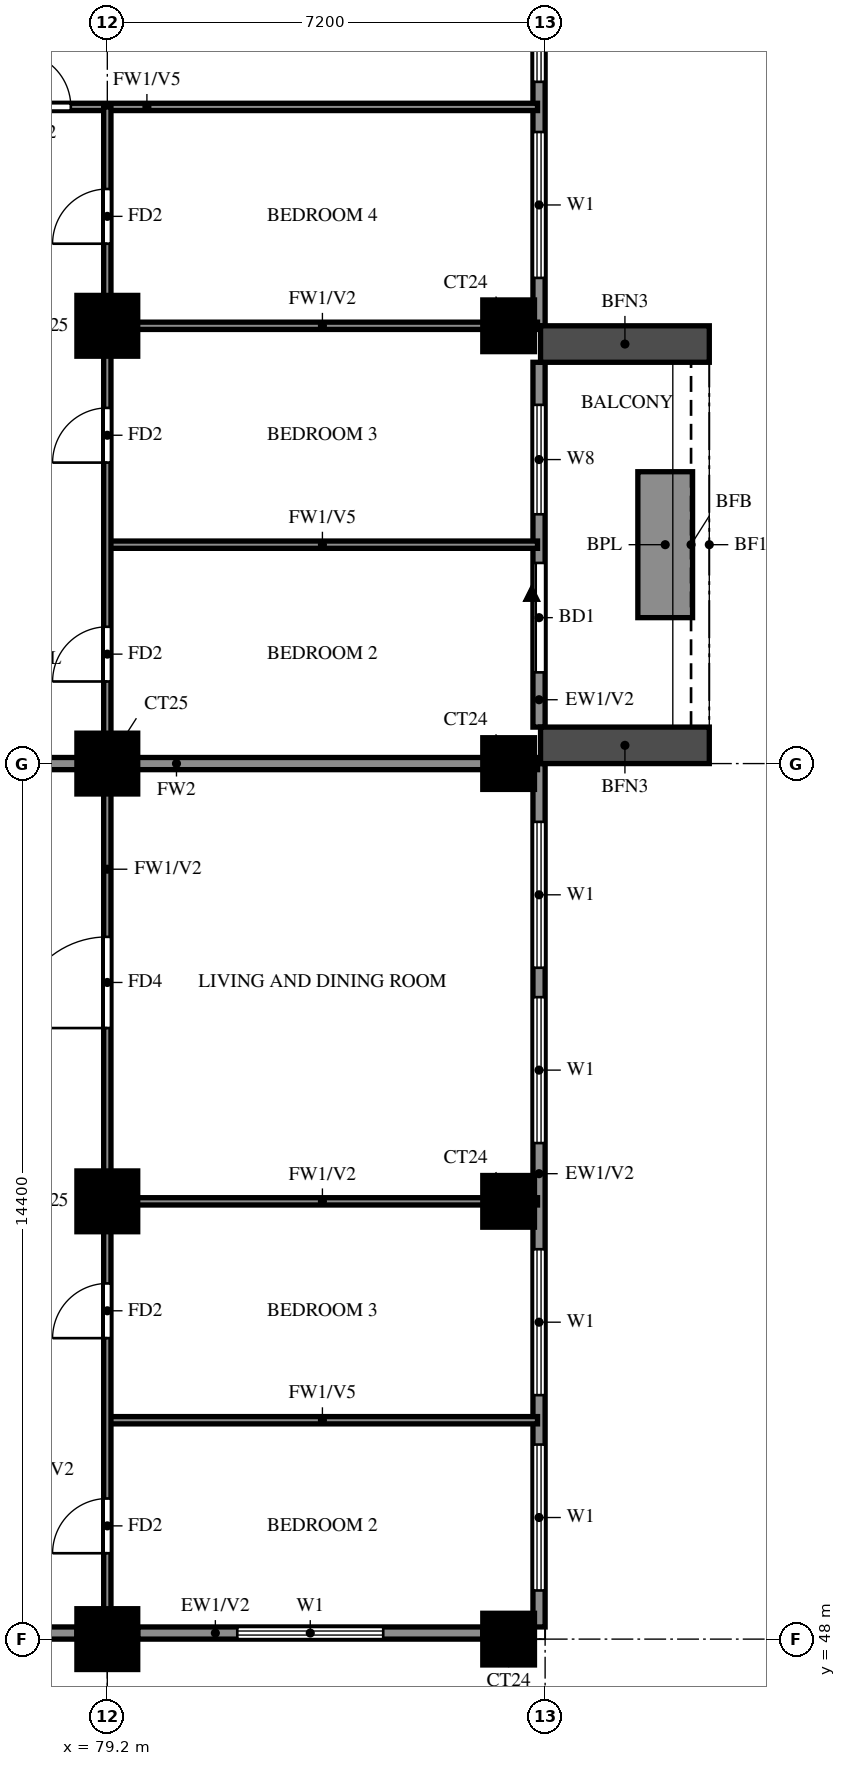
"""IFC4 building model, lengths in metres.
Left out: names, types, materials, properties, quantities, classifications, styles, units other than length and angle.
Written with IfcOpenShell. Run it as: python <this file> out.ifc"""

import sys

from ifc_helpers import new_model, si_unit, direction, frame, frame_2d, origin, origin_2d, place, context, subcontext, project, spatial, rectangle, extrude, source, transform, mapped, element, fill, save


model = new_model("IFC4")
c1 = context("Model", 3, precision=1e-05, world=origin(), true_north=direction((0.0, 1.0)))
c2 = subcontext(c1, "Body", "Model", "MODEL_VIEW")
j1 = project(units=[si_unit("LENGTHUNIT", "METRE"), si_unit("PLANEANGLEUNIT", "RADIAN")], contexts=[c1])
p1 = place(None, origin())
s1 = spatial("IfcSite", under=j1, at=p1, CompositionType="ELEMENT")
p2 = place(p1, origin())
s2 = spatial("IfcBuilding", under=s1, at=p2, CompositionType="ELEMENT")
p3 = place(p2, frame((0.0, 0.0, 157.0)))
s3 = spatial("IfcBuildingStorey", under=s2, at=p3, CompositionType="ELEMENT", Elevation=157.0)
m1 = source(origin(), c2, "Body", "SweptSolid", [
    extrude(rectangle(XDim=1.0, YDim=1.0, at=origin_2d()), origin(), (0.0, 0.0, 1.0), 3.2),
])
p4 = place(p3, frame((79.2, 48.0, 0.0), z_axis=(0.0, 0.0, 1.0), x_axis=(1.0, 0.0, 0.0)))
e1 = element("IfcColumn", 1, at=p4, inside=s3, PredefinedType="COLUMN", context=c2, shape_type="MappedRepresentation", body=[
    mapped(m1, transform((0.0, 0.0, 0.0))),
])
m2 = source(origin(), c2, "Body", "SweptSolid", [
    extrude(rectangle(XDim=0.85, YDim=0.85, at=origin_2d()), origin(), (0.0, 0.0, 1.0), 3.2),
])
p5 = place(p3, frame((85.8, 48.0, 0.0), z_axis=(0.0, 0.0, 1.0), x_axis=(1.0, 0.0, 0.0)))
e2 = element("IfcColumn", 2, at=p5, inside=s3, PredefinedType="COLUMN", context=c2, shape_type="MappedRepresentation", body=[
    mapped(m2, transform((0.0, 0.0, 0.0))),
])
p6 = place(p3, frame((79.2, 55.2, 0.0), z_axis=(0.0, 0.0, 1.0), x_axis=(1.0, 0.0, 0.0)))
e3 = element("IfcColumn", 3, at=p6, inside=s3, PredefinedType="COLUMN", context=c2, shape_type="MappedRepresentation", body=[
    mapped(m1, transform((0.0, 0.0, 0.0))),
])
p7 = place(p3, frame((85.8, 55.2, 0.0), z_axis=(0.0, 0.0, 1.0), x_axis=(1.0, 0.0, 0.0)))
e4 = element("IfcColumn", 4, at=p7, inside=s3, PredefinedType="COLUMN", context=c2, shape_type="MappedRepresentation", body=[
    mapped(m2, transform((0.0, 0.0, 0.0))),
])
p8 = place(p3, frame((79.2, 62.4, 0.0), z_axis=(0.0, 0.0, 1.0), x_axis=(1.0, 0.0, 0.0)))
e5 = element("IfcColumn", 5, at=p8, inside=s3, PredefinedType="COLUMN", context=c2, shape_type="MappedRepresentation", body=[
    mapped(m1, transform((0.0, 0.0, 0.0))),
])
p9 = place(p3, frame((85.8, 62.4, 0.0), z_axis=(0.0, 0.0, 1.0), x_axis=(1.0, 0.0, 0.0)))
e6 = element("IfcColumn", 6, at=p9, inside=s3, PredefinedType="COLUMN", context=c2, shape_type="MappedRepresentation", body=[
    mapped(m2, transform((0.0, 0.0, 0.0))),
])
p10 = place(p3, frame((79.2, 69.6, 0.0), z_axis=(0.0, 0.0, 1.0), x_axis=(1.0, 0.0, 0.0)))
e7 = element("IfcColumn", 7, at=p10, inside=s3, PredefinedType="COLUMN", context=c2, shape_type="MappedRepresentation", body=[
    mapped(m1, transform((0.0, 0.0, 0.0))),
])
p11 = place(p3, frame((85.8, 69.6, 0.0), z_axis=(0.0, 0.0, 1.0), x_axis=(1.0, 0.0, 0.0)))
e8 = element("IfcColumn", 8, at=p11, inside=s3, PredefinedType="COLUMN", context=c2, shape_type="MappedRepresentation", body=[
    mapped(m2, transform((0.0, 0.0, 0.0))),
])
p12 = place(p3, frame((85.719, 39.881, 0.0), z_axis=(0.0, 0.0, 1.0), x_axis=(-0.86377618652, 0.503875678716, 0.0)))
e9 = element("IfcWall", 9, at=p12, inside=s3, PredefinedType="SOLIDWALL", context=c2, shape_type="SweptSolid", body=[
    extrude(rectangle(XDim=16.311, YDim=0.2, at=frame_2d((8.156, 0.0))), origin(), (0.0, 0.0, 1.0), 3.2),
])
p13 = place(p12, frame((13.326, 0.0, 1.5)))
e10 = element("IfcOpeningElement", 10, at=p13, cuts=e9, PredefinedType="OPENING", context=c2, shape_type="SweptSolid", body=[
    extrude(rectangle(XDim=0.9, YDim=0.9, at=frame_2d((0.45, 0.45))), frame((0.0, 0.11, 0.0), z_axis=(0.0, -1.0, 0.0), x_axis=(1.0, 0.0, 0.0)), (0.0, 0.0, 1.0), 0.22),
])
p14 = place(p3, frame((71.99, 48.1, 0.0), z_axis=(0.0, 0.0, 1.0), x_axis=(1.0, 0.0, 0.0)))
e11 = element("IfcWall", 11, at=p14, inside=s3, PredefinedType="SOLIDWALL", context=c2, shape_type="SweptSolid", body=[
    extrude(rectangle(XDim=6.71, YDim=0.2, at=frame_2d((3.355, 0.0))), origin(), (0.0, 0.0, 1.0), 3.2),
])
p15 = place(p3, frame((79.7, 48.1, 0.0), z_axis=(0.0, 0.0, 1.0), x_axis=(1.0, 0.0, 0.0)))
e12 = element("IfcWall", 12, at=p15, inside=s3, PredefinedType="SOLIDWALL", context=c2, shape_type="SweptSolid", body=[
    extrude(rectangle(XDim=5.675, YDim=0.2, at=frame_2d((2.837, 0.0))), origin(), (0.0, 0.0, 1.0), 3.2),
])
p16 = place(p15, frame((1.637, 0.0, 0.6)))
e13 = element("IfcOpeningElement", 13, at=p16, cuts=e12, PredefinedType="OPENING", context=c2, shape_type="SweptSolid", body=[
    extrude(rectangle(XDim=2.4, YDim=2.4, at=frame_2d((1.2, 1.2))), frame((0.0, 0.11, 0.0), z_axis=(0.0, -1.0, 0.0), x_axis=(1.0, 0.0, 0.0)), (0.0, 0.0, 1.0), 0.22),
])
p17 = place(p3, frame((86.3, 48.2, 0.0), z_axis=(0.0, 0.0, 1.0), x_axis=(0.0, 1.0, 0.0)))
e14 = element("IfcWall", 14, at=p17, inside=s3, PredefinedType="SOLIDWALL", context=c2, shape_type="SweptSolid", body=[
    extrude(rectangle(XDim=14.2, YDim=0.2, at=frame_2d((7.1, 0.0))), origin(), (0.0, 0.0, 1.0), 3.2),
])
p18 = place(p17, frame((0.6, 0.0, 0.6)))
e15 = element("IfcOpeningElement", 15, at=p18, cuts=e14, PredefinedType="OPENING", context=c2, shape_type="SweptSolid", body=[
    extrude(rectangle(XDim=2.4, YDim=2.4, at=frame_2d((1.2, 1.2))), frame((0.0, 0.11, 0.0), z_axis=(0.0, -1.0, 0.0), x_axis=(1.0, 0.0, 0.0)), (0.0, 0.0, 1.0), 0.22),
])
p19 = place(p17, frame((3.812, 0.0, 0.6)))
e16 = element("IfcOpeningElement", 16, at=p19, cuts=e14, PredefinedType="OPENING", context=c2, shape_type="SweptSolid", body=[
    extrude(rectangle(XDim=2.4, YDim=2.4, at=frame_2d((1.2, 1.2))), frame((0.0, 0.11, 0.0), z_axis=(0.0, -1.0, 0.0), x_axis=(1.0, 0.0, 0.0)), (0.0, 0.0, 1.0), 0.22),
])
p20 = place(p17, frame((7.958, 0.0, 0.6)))
e17 = element("IfcOpeningElement", 17, at=p20, cuts=e14, PredefinedType="OPENING", context=c2, shape_type="SweptSolid", body=[
    extrude(rectangle(XDim=2.4, YDim=2.4, at=frame_2d((1.2, 1.2))), frame((0.0, 0.11, 0.0), z_axis=(0.0, -1.0, 0.0), x_axis=(1.0, 0.0, 0.0)), (0.0, 0.0, 1.0), 0.22),
])
p21 = place(p17, frame((10.842, 0.0, 0.6)))
e18 = element("IfcOpeningElement", 18, at=p21, cuts=e14, PredefinedType="OPENING", context=c2, shape_type="SweptSolid", body=[
    extrude(rectangle(XDim=2.4, YDim=2.4, at=frame_2d((1.2, 1.2))), frame((0.0, 0.11, 0.0), z_axis=(0.0, -1.0, 0.0), x_axis=(1.0, 0.0, 0.0)), (0.0, 0.0, 1.0), 0.22),
])
p22 = place(p3, frame((86.3, 63.0, 0.0), z_axis=(0.0, 0.0, 1.0), x_axis=(0.0, 1.0, 0.0)))
e19 = element("IfcWall", 19, at=p22, inside=s3, PredefinedType="SOLIDWALL", context=c2, shape_type="SweptSolid", body=[
    extrude(rectangle(XDim=6.0, YDim=0.2, at=frame_2d((3.0, 0.0))), origin(), (0.0, 0.0, 1.0), 3.2),
])
p23 = place(p22, frame((0.9, 0.0, 0.0)))
e20 = element("IfcOpeningElement", 20, at=p23, cuts=e19, PredefinedType="OPENING", context=c2, shape_type="SweptSolid", body=[
    extrude(rectangle(XDim=1.8, YDim=2.4, at=frame_2d((0.9, 1.2))), frame((0.0, 0.11, 0.0), z_axis=(0.0, -1.0, 0.0), x_axis=(1.0, 0.0, 0.0)), (0.0, 0.0, 1.0), 0.22),
])
p24 = place(p22, frame((3.5, 0.0, 0.6)))
e21 = element("IfcOpeningElement", 21, at=p24, cuts=e19, PredefinedType="OPENING", context=c2, shape_type="SweptSolid", body=[
    extrude(rectangle(XDim=1.8, YDim=2.4, at=frame_2d((0.9, 1.2))), frame((0.0, 0.11, 0.0), z_axis=(0.0, -1.0, 0.0), x_axis=(1.0, 0.0, 0.0)), (0.0, 0.0, 1.0), 0.22),
])
p25 = place(p3, frame((86.3, 69.6, 0.0), z_axis=(0.0, 0.0, 1.0), x_axis=(0.0, 1.0, 0.0)))
e22 = element("IfcWall", 22, at=p25, inside=s3, PredefinedType="SOLIDWALL", context=c2, shape_type="SweptSolid", body=[
    extrude(rectangle(XDim=7.2, YDim=0.2, at=frame_2d((3.6, 0.0))), origin(), (0.0, 0.0, 1.0), 3.2),
])
p26 = place(p25, frame((0.788, 0.0, 0.6)))
e23 = element("IfcOpeningElement", 23, at=p26, cuts=e22, PredefinedType="OPENING", context=c2, shape_type="SweptSolid", body=[
    extrude(rectangle(XDim=2.4, YDim=2.4, at=frame_2d((1.2, 1.2))), frame((0.0, 0.11, 0.0), z_axis=(0.0, -1.0, 0.0), x_axis=(1.0, 0.0, 0.0)), (0.0, 0.0, 1.0), 0.22),
])
p27 = place(p25, frame((4.012, 0.0, 0.6)))
e24 = element("IfcOpeningElement", 24, at=p27, cuts=e22, PredefinedType="OPENING", context=c2, shape_type="SweptSolid", body=[
    extrude(rectangle(XDim=2.4, YDim=2.4, at=frame_2d((1.2, 1.2))), frame((0.0, 0.11, 0.0), z_axis=(0.0, -1.0, 0.0), x_axis=(1.0, 0.0, 0.0)), (0.0, 0.0, 1.0), 0.22),
])
for number, where, z_axis, x_axis in (
    (25, (86.325, 62.7, 0.0), (0.0, 0.0, 1.0), (1.0, 0.0, 0.0)),
    (26, (86.325, 69.3, 0.0), (0.0, 0.0, 1.0), (1.0, 0.0, 0.0)),
):
    element("IfcWall", number, at=place(p3, frame(where, z_axis=z_axis, x_axis=x_axis)), inside=s3, PredefinedType="SOLIDWALL", context=c2, shape_type="SweptSolid", body=[
        extrude(rectangle(XDim=2.775, YDim=0.6, at=frame_2d((1.388, 0.0))), origin(), (0.0, 0.0, 1.0), 2.85),
    ])
p28 = place(p3, frame((88.375, 64.8, 0.0), z_axis=(0.0, 0.0, 1.0), x_axis=(0.0, 1.0, 0.0)))
e27 = element("IfcWall", 27, at=p28, inside=s3, PredefinedType="SOLIDWALL", context=c2, shape_type="SweptSolid", body=[
    extrude(rectangle(XDim=2.4, YDim=0.9, at=frame_2d((1.2, 0.0))), origin(), (0.0, 0.0, 1.0), 0.9),
])
p29 = place(p3, frame((74.4, 62.4, 0.0), z_axis=(0.0, 0.0, 1.0), x_axis=(1.0, 0.0, 0.0)))
e28 = element("IfcWall", 28, at=p29, inside=s3, PredefinedType="SOLIDWALL", context=c2, shape_type="SweptSolid", body=[
    extrude(rectangle(XDim=11.875, YDim=0.2, at=frame_2d((5.938, 0.0))), origin(), (0.0, 0.0, 1.0), 3.2),
])
p30 = place(p3, frame((79.2, 51.6, 0.0), z_axis=(0.0, 0.0, 1.0), x_axis=(1.0, 0.0, 0.0)))
e29 = element("IfcWall", 29, at=p30, inside=s3, PredefinedType="PARTITIONING", context=c2, shape_type="SweptSolid", body=[
    extrude(rectangle(XDim=7.075, YDim=0.12, at=frame_2d((3.538, 0.0))), origin(), (0.0, 0.0, 1.0), 2.3),
])
p31 = place(p3, frame((79.2, 55.2, 0.0), z_axis=(0.0, 0.0, 1.0), x_axis=(1.0, 0.0, 0.0)))
e30 = element("IfcWall", 30, at=p31, inside=s3, PredefinedType="PARTITIONING", context=c2, shape_type="SweptSolid", body=[
    extrude(rectangle(XDim=7.075, YDim=0.12, at=frame_2d((3.538, 0.0))), origin(), (0.0, 0.0, 1.0), 3.2),
])
p32 = place(p3, frame((79.2, 66.0, 0.0), z_axis=(0.0, 0.0, 1.0), x_axis=(1.0, 0.0, 0.0)))
e31 = element("IfcWall", 31, at=p32, inside=s3, PredefinedType="PARTITIONING", context=c2, shape_type="SweptSolid", body=[
    extrude(rectangle(XDim=7.075, YDim=0.12, at=frame_2d((3.538, 0.0))), origin(), (0.0, 0.0, 1.0), 2.3),
])
p33 = place(p3, frame((79.2, 69.6, 0.0), z_axis=(0.0, 0.0, 1.0), x_axis=(1.0, 0.0, 0.0)))
e32 = element("IfcWall", 32, at=p33, inside=s3, PredefinedType="PARTITIONING", context=c2, shape_type="SweptSolid", body=[
    extrude(rectangle(XDim=7.075, YDim=0.12, at=frame_2d((3.538, 0.0))), origin(), (0.0, 0.0, 1.0), 3.2),
])
p34 = place(p3, frame((72.0, 73.2, 0.0), z_axis=(0.0, 0.0, 1.0), x_axis=(1.0, 0.0, 0.0)))
e33 = element("IfcWall", 33, at=p34, inside=s3, PredefinedType="PARTITIONING", context=c2, shape_type="SweptSolid", body=[
    extrude(rectangle(XDim=14.275, YDim=0.12, at=frame_2d((7.137, 0.0))), origin(), (0.0, 0.0, 1.0), 2.3),
])
p35 = place(p34, frame((5.7, 0.0, 0.0)))
e34 = element("IfcOpeningElement", 34, at=p35, cuts=e33, PredefinedType="OPENING", context=c2, shape_type="SweptSolid", body=[
    extrude(rectangle(XDim=0.9, YDim=2.1, at=frame_2d((0.45, 1.05))), frame((0.0, 0.07, 0.0), z_axis=(0.0, -1.0, 0.0), x_axis=(1.0, 0.0, 0.0)), (0.0, 0.0, 1.0), 0.14),
])
p36 = place(p3, frame((79.2, 48.125, 0.0), z_axis=(0.0, 0.0, 1.0), x_axis=(0.0, 1.0, 0.0)))
e35 = element("IfcWall", 35, at=p36, inside=s3, PredefinedType="PARTITIONING", context=c2, shape_type="SweptSolid", body=[
    extrude(rectangle(XDim=25.075, YDim=0.12, at=frame_2d((12.538, 0.0))), origin(), (0.0, 0.0, 1.0), 3.2),
])
p37 = place(p36, frame((1.288, 0.0, 0.0)))
e36 = element("IfcOpeningElement", 36, at=p37, cuts=e35, PredefinedType="OPENING", context=c2, shape_type="SweptSolid", body=[
    extrude(rectangle(XDim=0.9, YDim=2.1, at=frame_2d((0.45, 1.05))), frame((0.0, 0.07, 0.0), z_axis=(0.0, -1.0, 0.0), x_axis=(1.0, 0.0, 0.0)), (0.0, 0.0, 1.0), 0.14),
])
p38 = place(p36, frame((4.825, 0.0, 0.0)))
e37 = element("IfcOpeningElement", 37, at=p38, cuts=e35, PredefinedType="OPENING", context=c2, shape_type="SweptSolid", body=[
    extrude(rectangle(XDim=0.9, YDim=2.1, at=frame_2d((0.45, 1.05))), frame((0.0, 0.07, 0.0), z_axis=(0.0, -1.0, 0.0), x_axis=(1.0, 0.0, 0.0)), (0.0, 0.0, 1.0), 0.14),
])
p39 = place(p36, frame((9.925, 0.0, 0.0)))
e38 = element("IfcOpeningElement", 38, at=p39, cuts=e35, PredefinedType="OPENING", context=c2, shape_type="SweptSolid", body=[
    extrude(rectangle(XDim=1.5, YDim=2.1, at=frame_2d((0.75, 1.05))), frame((0.0, 0.07, 0.0), z_axis=(0.0, -1.0, 0.0), x_axis=(1.0, 0.0, 0.0)), (0.0, 0.0, 1.0), 0.14),
])
p40 = place(p36, frame((15.625, 0.0, 0.0)))
e39 = element("IfcOpeningElement", 39, at=p40, cuts=e35, PredefinedType="OPENING", context=c2, shape_type="SweptSolid", body=[
    extrude(rectangle(XDim=0.9, YDim=2.1, at=frame_2d((0.45, 1.05))), frame((0.0, 0.07, 0.0), z_axis=(0.0, -1.0, 0.0), x_axis=(1.0, 0.0, 0.0)), (0.0, 0.0, 1.0), 0.14),
])
p41 = place(p36, frame((19.225, 0.0, 0.0)))
e40 = element("IfcOpeningElement", 40, at=p41, cuts=e35, PredefinedType="OPENING", context=c2, shape_type="SweptSolid", body=[
    extrude(rectangle(XDim=0.9, YDim=2.1, at=frame_2d((0.45, 1.05))), frame((0.0, 0.07, 0.0), z_axis=(0.0, -1.0, 0.0), x_axis=(1.0, 0.0, 0.0)), (0.0, 0.0, 1.0), 0.14),
])
p42 = place(p36, frame((22.825, 0.0, 0.0)))
e41 = element("IfcOpeningElement", 41, at=p42, cuts=e35, PredefinedType="OPENING", context=c2, shape_type="SweptSolid", body=[
    extrude(rectangle(XDim=0.9, YDim=2.1, at=frame_2d((0.45, 1.05))), frame((0.0, 0.07, 0.0), z_axis=(0.0, -1.0, 0.0), x_axis=(1.0, 0.0, 0.0)), (0.0, 0.0, 1.0), 0.14),
])
p43 = place(p16, origin())
e42 = element("IfcWindow", 42, at=p43, inside=s3, PartitioningType="DOUBLE_PANEL_VERTICAL", PredefinedType="WINDOW", context=c2, shape_type="SweptSolid", body=[
    extrude(rectangle(XDim=2.4, YDim=2.4, at=frame_2d((1.2, 1.2))), frame((0.0, 0.03, 0.0), z_axis=(0.0, -1.0, 0.0), x_axis=(1.0, 0.0, 0.0)), (0.0, 0.0, 1.0), 0.06),
])
fill(e13, e42)
p44 = place(p18, origin())
e43 = element("IfcWindow", 43, at=p44, inside=s3, PartitioningType="DOUBLE_PANEL_VERTICAL", PredefinedType="WINDOW", context=c2, shape_type="SweptSolid", body=[
    extrude(rectangle(XDim=2.4, YDim=2.4, at=frame_2d((1.2, 1.2))), frame((0.0, 0.03, 0.0), z_axis=(0.0, -1.0, 0.0), x_axis=(1.0, 0.0, 0.0)), (0.0, 0.0, 1.0), 0.06),
])
fill(e15, e43)
p45 = place(p19, origin())
e44 = element("IfcWindow", 44, at=p45, inside=s3, PartitioningType="DOUBLE_PANEL_VERTICAL", PredefinedType="WINDOW", context=c2, shape_type="SweptSolid", body=[
    extrude(rectangle(XDim=2.4, YDim=2.4, at=frame_2d((1.2, 1.2))), frame((0.0, 0.03, 0.0), z_axis=(0.0, -1.0, 0.0), x_axis=(1.0, 0.0, 0.0)), (0.0, 0.0, 1.0), 0.06),
])
fill(e16, e44)
p46 = place(p20, origin())
e45 = element("IfcWindow", 45, at=p46, inside=s3, PartitioningType="DOUBLE_PANEL_VERTICAL", PredefinedType="WINDOW", context=c2, shape_type="SweptSolid", body=[
    extrude(rectangle(XDim=2.4, YDim=2.4, at=frame_2d((1.2, 1.2))), frame((0.0, 0.03, 0.0), z_axis=(0.0, -1.0, 0.0), x_axis=(1.0, 0.0, 0.0)), (0.0, 0.0, 1.0), 0.06),
])
fill(e17, e45)
p47 = place(p21, origin())
e46 = element("IfcWindow", 46, at=p47, inside=s3, PartitioningType="DOUBLE_PANEL_VERTICAL", PredefinedType="WINDOW", context=c2, shape_type="SweptSolid", body=[
    extrude(rectangle(XDim=2.4, YDim=2.4, at=frame_2d((1.2, 1.2))), frame((0.0, 0.03, 0.0), z_axis=(0.0, -1.0, 0.0), x_axis=(1.0, 0.0, 0.0)), (0.0, 0.0, 1.0), 0.06),
])
fill(e18, e46)
p48 = place(p23, origin())
e47 = element("IfcDoor", 47, at=p48, inside=s3, OperationType="DOUBLE_DOOR_SLIDING", PredefinedType="DOOR", context=c2, shape_type="SweptSolid", body=[
    extrude(rectangle(XDim=1.8, YDim=2.4, at=frame_2d((0.9, 1.2))), frame((0.0, 0.025, 0.0), z_axis=(0.0, -1.0, 0.0), x_axis=(1.0, 0.0, 0.0)), (0.0, 0.0, 1.0), 0.05),
])
fill(e20, e47)
p49 = place(p24, origin())
e48 = element("IfcWindow", 48, at=p49, inside=s3, PartitioningType="DOUBLE_PANEL_VERTICAL", PredefinedType="WINDOW", context=c2, shape_type="SweptSolid", body=[
    extrude(rectangle(XDim=1.8, YDim=2.4, at=frame_2d((0.9, 1.2))), frame((0.0, 0.03, 0.0), z_axis=(0.0, -1.0, 0.0), x_axis=(1.0, 0.0, 0.0)), (0.0, 0.0, 1.0), 0.06),
])
fill(e21, e48)
p50 = place(p26, origin())
e49 = element("IfcWindow", 49, at=p50, inside=s3, PartitioningType="DOUBLE_PANEL_VERTICAL", PredefinedType="WINDOW", context=c2, shape_type="SweptSolid", body=[
    extrude(rectangle(XDim=2.4, YDim=2.4, at=frame_2d((1.2, 1.2))), frame((0.0, 0.03, 0.0), z_axis=(0.0, -1.0, 0.0), x_axis=(1.0, 0.0, 0.0)), (0.0, 0.0, 1.0), 0.06),
])
fill(e23, e49)
p51 = place(p27, origin())
e50 = element("IfcWindow", 50, at=p51, inside=s3, PartitioningType="DOUBLE_PANEL_VERTICAL", PredefinedType="WINDOW", context=c2, shape_type="SweptSolid", body=[
    extrude(rectangle(XDim=2.4, YDim=2.4, at=frame_2d((1.2, 1.2))), frame((0.0, 0.03, 0.0), z_axis=(0.0, -1.0, 0.0), x_axis=(1.0, 0.0, 0.0)), (0.0, 0.0, 1.0), 0.06),
])
fill(e24, e50)
p52 = place(p37, origin())
e51 = element("IfcDoor", 51, at=p52, inside=s3, OperationType="SINGLE_SWING_LEFT", PredefinedType="DOOR", context=c2, shape_type="SweptSolid", body=[
    extrude(rectangle(XDim=0.9, YDim=2.1, at=frame_2d((0.45, 1.05))), frame((0.0, 0.025, 0.0), z_axis=(0.0, -1.0, 0.0), x_axis=(1.0, 0.0, 0.0)), (0.0, 0.0, 1.0), 0.05),
])
fill(e36, e51)
p53 = place(p38, origin())
e52 = element("IfcDoor", 52, at=p53, inside=s3, OperationType="SINGLE_SWING_LEFT", PredefinedType="DOOR", context=c2, shape_type="SweptSolid", body=[
    extrude(rectangle(XDim=0.9, YDim=2.1, at=frame_2d((0.45, 1.05))), frame((0.0, 0.025, 0.0), z_axis=(0.0, -1.0, 0.0), x_axis=(1.0, 0.0, 0.0)), (0.0, 0.0, 1.0), 0.05),
])
fill(e37, e52)
p54 = place(p39, origin())
e53 = element("IfcDoor", 53, at=p54, inside=s3, OperationType="SINGLE_SWING_RIGHT", PredefinedType="DOOR", context=c2, shape_type="SweptSolid", body=[
    extrude(rectangle(XDim=1.5, YDim=2.1, at=frame_2d((0.75, 1.05))), frame((0.0, 0.025, 0.0), z_axis=(0.0, -1.0, 0.0), x_axis=(1.0, 0.0, 0.0)), (0.0, 0.0, 1.0), 0.05),
])
fill(e38, e53)
p55 = place(p40, origin())
e54 = element("IfcDoor", 54, at=p55, inside=s3, OperationType="SINGLE_SWING_LEFT", PredefinedType="DOOR", context=c2, shape_type="SweptSolid", body=[
    extrude(rectangle(XDim=0.9, YDim=2.1, at=frame_2d((0.45, 1.05))), frame((0.0, 0.025, 0.0), z_axis=(0.0, -1.0, 0.0), x_axis=(1.0, 0.0, 0.0)), (0.0, 0.0, 1.0), 0.05),
])
fill(e39, e54)
p56 = place(p41, origin())
e55 = element("IfcDoor", 55, at=p56, inside=s3, OperationType="SINGLE_SWING_LEFT", PredefinedType="DOOR", context=c2, shape_type="SweptSolid", body=[
    extrude(rectangle(XDim=0.9, YDim=2.1, at=frame_2d((0.45, 1.05))), frame((0.0, 0.025, 0.0), z_axis=(0.0, -1.0, 0.0), x_axis=(1.0, 0.0, 0.0)), (0.0, 0.0, 1.0), 0.05),
])
fill(e40, e55)
p57 = place(p42, origin())
e56 = element("IfcDoor", 56, at=p57, inside=s3, OperationType="SINGLE_SWING_RIGHT", PredefinedType="DOOR", context=c2, shape_type="SweptSolid", body=[
    extrude(rectangle(XDim=0.9, YDim=2.1, at=frame_2d((0.45, 1.05))), frame((0.0, 0.025, 0.0), z_axis=(0.0, -1.0, 0.0), x_axis=(1.0, 0.0, 0.0)), (0.0, 0.0, 1.0), 0.05),
])
fill(e41, e56)
p58 = place(p35, origin())
e57 = element("IfcDoor", 57, at=p58, inside=s3, OperationType="SINGLE_SWING_LEFT", PredefinedType="DOOR", context=c2, shape_type="SweptSolid", body=[
    extrude(rectangle(XDim=0.9, YDim=2.1, at=frame_2d((0.45, 1.05))), frame((0.0, 0.025, 0.0), z_axis=(0.0, -1.0, 0.0), x_axis=(1.0, 0.0, 0.0)), (0.0, 0.0, 1.0), 0.05),
])
fill(e34, e57)
save(model, sys.argv[1])
